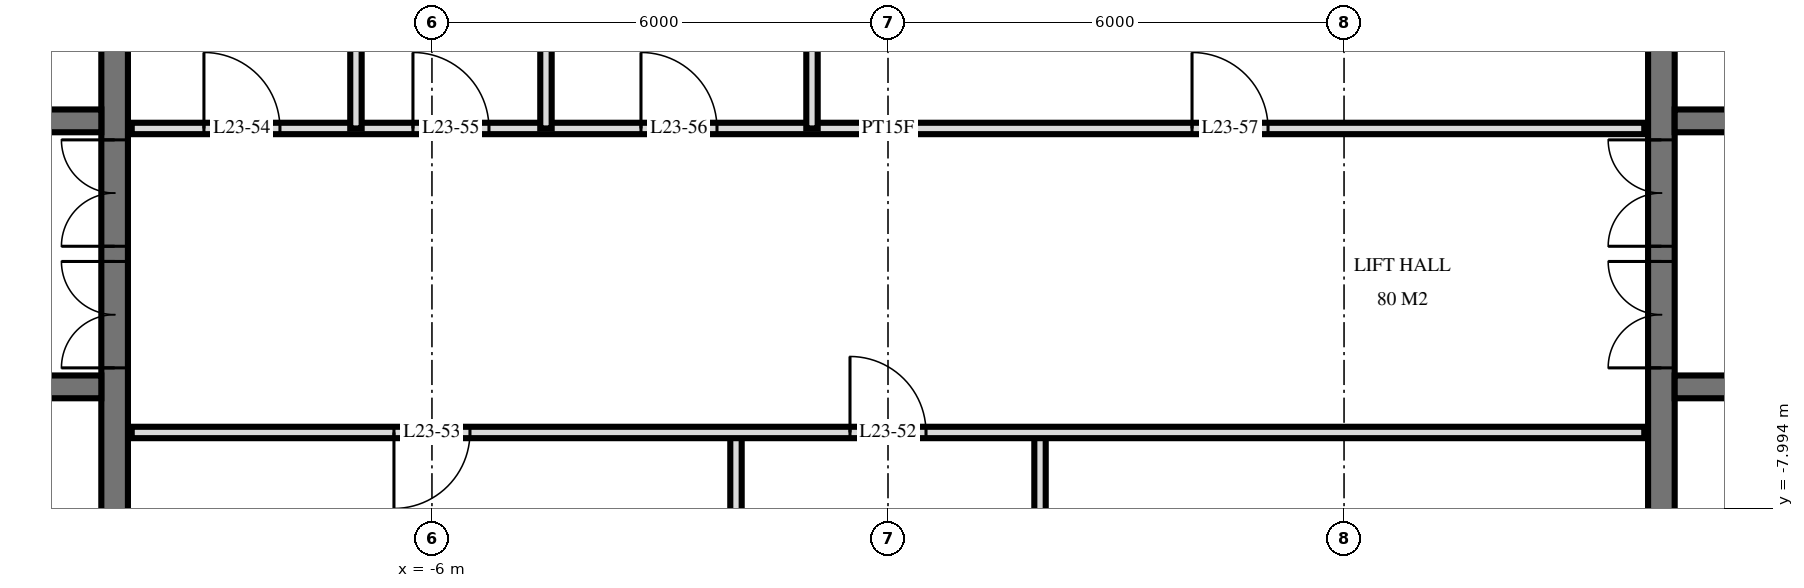
"""IFC4 building model, lengths in metres.
Left out: names, types, materials, properties, quantities, classifications, styles, units other than length and angle.
Written with IfcOpenShell. Run it as: python <this file> out.ifc"""

import sys

from ifc_helpers import new_model, si_unit, direction, frame, frame_2d, origin, place, context, subcontext, project, spatial, rectangle, extrude, element, fill, save


model = new_model("IFC4")
c1 = context("Model", 3, precision=1e-05, world=origin(), true_north=direction((0.0, 1.0)))
c2 = subcontext(c1, "Body", "Model", "MODEL_VIEW")
j1 = project(units=[si_unit("LENGTHUNIT", "METRE"), si_unit("PLANEANGLEUNIT", "RADIAN")], contexts=[c1])
p1 = place(None, origin())
s1 = spatial("IfcSite", under=j1, at=p1, CompositionType="ELEMENT")
p2 = place(p1, origin())
s2 = spatial("IfcBuilding", under=s1, at=p2, CompositionType="ELEMENT")
p3 = place(p2, frame((0.0, 0.0, 92.4)))
s3 = spatial("IfcBuildingStorey", under=s2, at=p3, CompositionType="ELEMENT", Elevation=92.4)
p4 = place(p3, frame((-10.175, -14.55, 0.0), z_axis=(0.0, 0.0, 1.0), x_axis=(0.0, 1.0, 0.0)))
e1 = element("IfcWall", 1, at=p4, inside=s3, PredefinedType="SHEAR", context=c2, shape_type="SweptSolid", body=[
    extrude(rectangle(XDim=14.1, YDim=0.35, at=frame_2d((7.05, 0.0))), origin(), (0.0, 0.0, 1.0), 3.6),
])
p5 = place(p4, frame((8.4, 0.0, 0.0)))
e2 = element("IfcOpeningElement", 2, at=p5, cuts=e1, PredefinedType="OPENING", context=c2, shape_type="SweptSolid", body=[
    extrude(rectangle(XDim=1.4, YDim=2.4, at=frame_2d((0.7, 1.2))), frame((0.0, 0.185, 0.0), z_axis=(0.0, -1.0, 0.0), x_axis=(1.0, 0.0, 0.0)), (0.0, 0.0, 1.0), 0.37),
])
p6 = place(p4, frame((10.0, 0.0, 0.0)))
e3 = element("IfcOpeningElement", 3, at=p6, cuts=e1, PredefinedType="OPENING", context=c2, shape_type="SweptSolid", body=[
    extrude(rectangle(XDim=1.4, YDim=2.4, at=frame_2d((0.7, 1.2))), frame((0.0, 0.185, 0.0), z_axis=(0.0, -1.0, 0.0), x_axis=(1.0, 0.0, 0.0)), (0.0, 0.0, 1.0), 0.37),
])
p7 = place(p4, frame((4.0, 0.0, 0.0)))
e4 = element("IfcOpeningElement", 4, at=p7, cuts=e1, PredefinedType="OPENING", context=c2, shape_type="SweptSolid", body=[
    extrude(rectangle(XDim=1.2, YDim=2.1, at=frame_2d((0.6, 1.05))), frame((0.0, 0.185, 0.0), z_axis=(0.0, -1.0, 0.0), x_axis=(1.0, 0.0, 0.0)), (0.0, 0.0, 1.0), 0.37),
])
p8 = place(p3, frame((-29.05, -2.9, 0.0), z_axis=(0.0, 0.0, 1.0), x_axis=(1.0, 0.0, 0.0)))
e5 = element("IfcWall", 5, at=p8, inside=s3, PredefinedType="SHEAR", context=c2, shape_type="SweptSolid", body=[
    extrude(rectangle(XDim=18.7, YDim=0.3, at=frame_2d((9.35, 0.0))), origin(), (0.0, 0.0, 1.0), 3.6),
])
p9 = place(p8, frame((2.95, 0.0, 0.0)))
e6 = element("IfcOpeningElement", 6, at=p9, cuts=e5, PredefinedType="OPENING", context=c2, shape_type="SweptSolid", body=[
    extrude(rectangle(XDim=1.1, YDim=2.1, at=frame_2d((0.55, 1.05))), frame((0.0, 0.16, 0.0), z_axis=(0.0, -1.0, 0.0), x_axis=(1.0, 0.0, 0.0)), (0.0, 0.0, 1.0), 0.32),
])
p10 = place(p8, frame((0.55, 0.0, 0.0)))
e7 = element("IfcOpeningElement", 7, at=p10, cuts=e5, PredefinedType="OPENING", context=c2, shape_type="SweptSolid", body=[
    extrude(rectangle(XDim=1.1, YDim=2.1, at=frame_2d((0.55, 1.05))), frame((0.0, 0.16, 0.0), z_axis=(0.0, -1.0, 0.0), x_axis=(1.0, 0.0, 0.0)), (0.0, 0.0, 1.0), 0.32),
])
p11 = place(p8, frame((10.9, 0.0, 0.0)))
e8 = element("IfcOpeningElement", 8, at=p11, cuts=e5, PredefinedType="OPENING", context=c2, shape_type="SweptSolid", body=[
    extrude(rectangle(XDim=0.9, YDim=2.1, at=frame_2d((0.45, 1.05))), frame((0.0, 0.16, 0.0), z_axis=(0.0, -1.0, 0.0), x_axis=(1.0, 0.0, 0.0)), (0.0, 0.0, 1.0), 0.32),
])
p12 = place(p8, frame((16.85, 0.0, 0.0)))
e9 = element("IfcOpeningElement", 9, at=p12, cuts=e5, PredefinedType="OPENING", context=c2, shape_type="SweptSolid", body=[
    extrude(rectangle(XDim=1.0, YDim=2.1, at=frame_2d((0.5, 1.05))), frame((0.0, 0.16, 0.0), z_axis=(0.0, -1.0, 0.0), x_axis=(1.0, 0.0, 0.0)), (0.0, 0.0, 1.0), 0.32),
])
p13 = place(p8, frame((14.312, 0.0, 0.0)))
e10 = element("IfcOpeningElement", 10, at=p13, cuts=e5, PredefinedType="OPENING", context=c2, shape_type="SweptSolid", body=[
    extrude(rectangle(XDim=1.0, YDim=2.1, at=frame_2d((0.5, 1.05))), frame((0.0, 0.16, 0.0), z_axis=(0.0, -1.0, 0.0), x_axis=(1.0, 0.0, 0.0)), (0.0, 0.0, 1.0), 0.32),
])
p14 = place(p8, frame((12.887, 0.0, 0.0)))
e11 = element("IfcOpeningElement", 11, at=p14, cuts=e5, PredefinedType="OPENING", context=c2, shape_type="SweptSolid", body=[
    extrude(rectangle(XDim=1.0, YDim=2.1, at=frame_2d((0.5, 1.05))), frame((0.0, 0.16, 0.0), z_axis=(0.0, -1.0, 0.0), x_axis=(1.0, 0.0, 0.0)), (0.0, 0.0, 1.0), 0.32),
])
p15 = place(p8, frame((5.6, 0.0, 0.0)))
e12 = element("IfcOpeningElement", 12, at=p15, cuts=e5, PredefinedType="OPENING", context=c2, shape_type="SweptSolid", body=[
    extrude(rectangle(XDim=1.0, YDim=2.1, at=frame_2d((0.5, 1.05))), frame((0.0, 0.16, 0.0), z_axis=(0.0, -1.0, 0.0), x_axis=(1.0, 0.0, 0.0)), (0.0, 0.0, 1.0), 0.32),
])
p16 = place(p3, frame((-29.05, -6.4, 0.0), z_axis=(0.0, 0.0, 1.0), x_axis=(1.0, 0.0, 0.0)))
e13 = element("IfcWall", 13, at=p16, inside=s3, PredefinedType="SHEAR", context=c2, shape_type="SweptSolid", body=[
    extrude(rectangle(XDim=18.7, YDim=0.3, at=frame_2d((9.35, 0.0))), origin(), (0.0, 0.0, 1.0), 3.6),
])
p17 = place(p16, frame((2.95, 0.0, 0.0)))
e14 = element("IfcOpeningElement", 14, at=p17, cuts=e13, PredefinedType="OPENING", context=c2, shape_type="SweptSolid", body=[
    extrude(rectangle(XDim=1.1, YDim=2.1, at=frame_2d((0.55, 1.05))), frame((0.0, 0.16, 0.0), z_axis=(0.0, -1.0, 0.0), x_axis=(1.0, 0.0, 0.0)), (0.0, 0.0, 1.0), 0.32),
])
p18 = place(p16, frame((0.55, 0.0, 0.0)))
e15 = element("IfcOpeningElement", 15, at=p18, cuts=e13, PredefinedType="OPENING", context=c2, shape_type="SweptSolid", body=[
    extrude(rectangle(XDim=1.1, YDim=2.1, at=frame_2d((0.55, 1.05))), frame((0.0, 0.16, 0.0), z_axis=(0.0, -1.0, 0.0), x_axis=(1.0, 0.0, 0.0)), (0.0, 0.0, 1.0), 0.32),
])
p19 = place(p16, frame((10.8, 0.0, 0.0)))
e16 = element("IfcOpeningElement", 16, at=p19, cuts=e13, PredefinedType="OPENING", context=c2, shape_type="SweptSolid", body=[
    extrude(rectangle(XDim=1.1, YDim=2.1, at=frame_2d((0.55, 1.05))), frame((0.0, 0.16, 0.0), z_axis=(0.0, -1.0, 0.0), x_axis=(1.0, 0.0, 0.0)), (0.0, 0.0, 1.0), 0.32),
])
p20 = place(p16, frame((5.6, 0.0, 0.0)))
e17 = element("IfcOpeningElement", 17, at=p20, cuts=e13, PredefinedType="OPENING", context=c2, shape_type="SweptSolid", body=[
    extrude(rectangle(XDim=1.0, YDim=2.1, at=frame_2d((0.5, 1.05))), frame((0.0, 0.16, 0.0), z_axis=(0.0, -1.0, 0.0), x_axis=(1.0, 0.0, 0.0)), (0.0, 0.0, 1.0), 0.32),
])
p21 = place(p3, frame((10.175, -14.55, 0.0), z_axis=(0.0, 0.0, 1.0), x_axis=(0.0, 1.0, 0.0)))
e18 = element("IfcWall", 18, at=p21, inside=s3, PredefinedType="SHEAR", context=c2, shape_type="SweptSolid", body=[
    extrude(rectangle(XDim=14.1, YDim=0.35, at=frame_2d((7.05, 0.0))), origin(), (0.0, 0.0, 1.0), 3.6),
])
p22 = place(p21, frame((8.4, 0.0, 0.0)))
e19 = element("IfcOpeningElement", 19, at=p22, cuts=e18, PredefinedType="OPENING", context=c2, shape_type="SweptSolid", body=[
    extrude(rectangle(XDim=1.4, YDim=2.4, at=frame_2d((0.7, 1.2))), frame((0.0, 0.185, 0.0), z_axis=(0.0, -1.0, 0.0), x_axis=(1.0, 0.0, 0.0)), (0.0, 0.0, 1.0), 0.37),
])
p23 = place(p21, frame((10.0, 0.0, 0.0)))
e20 = element("IfcOpeningElement", 20, at=p23, cuts=e18, PredefinedType="OPENING", context=c2, shape_type="SweptSolid", body=[
    extrude(rectangle(XDim=1.4, YDim=2.4, at=frame_2d((0.7, 1.2))), frame((0.0, 0.185, 0.0), z_axis=(0.0, -1.0, 0.0), x_axis=(1.0, 0.0, 0.0)), (0.0, 0.0, 1.0), 0.37),
])
p24 = place(p21, frame((4.0, 0.0, 0.0)))
e21 = element("IfcOpeningElement", 21, at=p24, cuts=e18, PredefinedType="OPENING", context=c2, shape_type="SweptSolid", body=[
    extrude(rectangle(XDim=1.2, YDim=2.1, at=frame_2d((0.6, 1.05))), frame((0.0, 0.185, 0.0), z_axis=(0.0, -1.0, 0.0), x_axis=(1.0, 0.0, 0.0)), (0.0, 0.0, 1.0), 0.37),
])
p25 = place(p3, frame((10.35, -2.9, 0.0), z_axis=(0.0, 0.0, 1.0), x_axis=(1.0, 0.0, 0.0)))
e22 = element("IfcWall", 22, at=p25, inside=s3, PredefinedType="SHEAR", context=c2, shape_type="SweptSolid", body=[
    extrude(rectangle(XDim=18.7, YDim=0.3, at=frame_2d((9.35, 0.0))), origin(), (0.0, 0.0, 1.0), 3.6),
])
p26 = place(p25, frame((14.65, 0.0, 0.0)))
e23 = element("IfcOpeningElement", 23, at=p26, cuts=e22, PredefinedType="OPENING", context=c2, shape_type="SweptSolid", body=[
    extrude(rectangle(XDim=1.1, YDim=2.1, at=frame_2d((0.55, 1.05))), frame((0.0, 0.16, 0.0), z_axis=(0.0, -1.0, 0.0), x_axis=(1.0, 0.0, 0.0)), (0.0, 0.0, 1.0), 0.32),
])
p27 = place(p25, frame((17.05, 0.0, 0.0)))
e24 = element("IfcOpeningElement", 24, at=p27, cuts=e22, PredefinedType="OPENING", context=c2, shape_type="SweptSolid", body=[
    extrude(rectangle(XDim=1.1, YDim=2.1, at=frame_2d((0.55, 1.05))), frame((0.0, 0.16, 0.0), z_axis=(0.0, -1.0, 0.0), x_axis=(1.0, 0.0, 0.0)), (0.0, 0.0, 1.0), 0.32),
])
p28 = place(p25, frame((6.9, 0.0, 0.0)))
e25 = element("IfcOpeningElement", 25, at=p28, cuts=e22, PredefinedType="OPENING", context=c2, shape_type="SweptSolid", body=[
    extrude(rectangle(XDim=0.9, YDim=2.1, at=frame_2d((0.45, 1.05))), frame((0.0, 0.16, 0.0), z_axis=(0.0, -1.0, 0.0), x_axis=(1.0, 0.0, 0.0)), (0.0, 0.0, 1.0), 0.32),
])
p29 = place(p25, frame((0.85, 0.0, 0.0)))
e26 = element("IfcOpeningElement", 26, at=p29, cuts=e22, PredefinedType="OPENING", context=c2, shape_type="SweptSolid", body=[
    extrude(rectangle(XDim=1.0, YDim=2.1, at=frame_2d((0.5, 1.05))), frame((0.0, 0.16, 0.0), z_axis=(0.0, -1.0, 0.0), x_axis=(1.0, 0.0, 0.0)), (0.0, 0.0, 1.0), 0.32),
])
p30 = place(p25, frame((3.387, 0.0, 0.0)))
e27 = element("IfcOpeningElement", 27, at=p30, cuts=e22, PredefinedType="OPENING", context=c2, shape_type="SweptSolid", body=[
    extrude(rectangle(XDim=1.0, YDim=2.1, at=frame_2d((0.5, 1.05))), frame((0.0, 0.16, 0.0), z_axis=(0.0, -1.0, 0.0), x_axis=(1.0, 0.0, 0.0)), (0.0, 0.0, 1.0), 0.32),
])
p31 = place(p25, frame((4.812, 0.0, 0.0)))
e28 = element("IfcOpeningElement", 28, at=p31, cuts=e22, PredefinedType="OPENING", context=c2, shape_type="SweptSolid", body=[
    extrude(rectangle(XDim=1.0, YDim=2.1, at=frame_2d((0.5, 1.05))), frame((0.0, 0.16, 0.0), z_axis=(0.0, -1.0, 0.0), x_axis=(1.0, 0.0, 0.0)), (0.0, 0.0, 1.0), 0.32),
])
p32 = place(p25, frame((12.1, 0.0, 0.0)))
e29 = element("IfcOpeningElement", 29, at=p32, cuts=e22, PredefinedType="OPENING", context=c2, shape_type="SweptSolid", body=[
    extrude(rectangle(XDim=1.0, YDim=2.1, at=frame_2d((0.5, 1.05))), frame((0.0, 0.16, 0.0), z_axis=(0.0, -1.0, 0.0), x_axis=(1.0, 0.0, 0.0)), (0.0, 0.0, 1.0), 0.32),
])
p33 = place(p3, frame((10.35, -6.4, 0.0), z_axis=(0.0, 0.0, 1.0), x_axis=(1.0, 0.0, 0.0)))
e30 = element("IfcWall", 30, at=p33, inside=s3, PredefinedType="SHEAR", context=c2, shape_type="SweptSolid", body=[
    extrude(rectangle(XDim=18.7, YDim=0.3, at=frame_2d((9.35, 0.0))), origin(), (0.0, 0.0, 1.0), 3.6),
])
p34 = place(p33, frame((14.65, 0.0, 0.0)))
e31 = element("IfcOpeningElement", 31, at=p34, cuts=e30, PredefinedType="OPENING", context=c2, shape_type="SweptSolid", body=[
    extrude(rectangle(XDim=1.1, YDim=2.1, at=frame_2d((0.55, 1.05))), frame((0.0, 0.16, 0.0), z_axis=(0.0, -1.0, 0.0), x_axis=(1.0, 0.0, 0.0)), (0.0, 0.0, 1.0), 0.32),
])
p35 = place(p33, frame((17.05, 0.0, 0.0)))
e32 = element("IfcOpeningElement", 32, at=p35, cuts=e30, PredefinedType="OPENING", context=c2, shape_type="SweptSolid", body=[
    extrude(rectangle(XDim=1.1, YDim=2.1, at=frame_2d((0.55, 1.05))), frame((0.0, 0.16, 0.0), z_axis=(0.0, -1.0, 0.0), x_axis=(1.0, 0.0, 0.0)), (0.0, 0.0, 1.0), 0.32),
])
p36 = place(p33, frame((6.8, 0.0, 0.0)))
e33 = element("IfcOpeningElement", 33, at=p36, cuts=e30, PredefinedType="OPENING", context=c2, shape_type="SweptSolid", body=[
    extrude(rectangle(XDim=1.1, YDim=2.1, at=frame_2d((0.55, 1.05))), frame((0.0, 0.16, 0.0), z_axis=(0.0, -1.0, 0.0), x_axis=(1.0, 0.0, 0.0)), (0.0, 0.0, 1.0), 0.32),
])
p37 = place(p33, frame((12.1, 0.0, 0.0)))
e34 = element("IfcOpeningElement", 34, at=p37, cuts=e30, PredefinedType="OPENING", context=c2, shape_type="SweptSolid", body=[
    extrude(rectangle(XDim=1.0, YDim=2.1, at=frame_2d((0.5, 1.05))), frame((0.0, 0.16, 0.0), z_axis=(0.0, -1.0, 0.0), x_axis=(1.0, 0.0, 0.0)), (0.0, 0.0, 1.0), 0.32),
])
p38 = place(p3, frame((2.0, -11.0, 0.0), z_axis=(0.0, 0.0, 1.0), x_axis=(0.0, 1.0, 0.0)))
e35 = element("IfcWall", 35, at=p38, inside=s3, PredefinedType="PARTITIONING", context=c2, shape_type="SweptSolid", body=[
    extrude(rectangle(XDim=4.0, YDim=0.15, at=frame_2d((2.0, 0.0))), origin(), (0.0, 0.0, 1.0), 3.32),
])
p39 = place(p3, frame((-1.0, -3.0, 0.0), z_axis=(0.0, 0.0, 1.0), x_axis=(0.0, 1.0, 0.0)))
e36 = element("IfcWall", 36, at=p39, inside=s3, PredefinedType="PARTITIONING", context=c2, shape_type="SweptSolid", body=[
    extrude(rectangle(XDim=4.02, YDim=0.15, at=frame_2d((2.01, 0.0))), origin(), (0.0, 0.0, 1.0), 3.32),
])
p40 = place(p3, frame((-2.0, -11.0, 0.0), z_axis=(0.0, 0.0, 1.0), x_axis=(0.0, 1.0, 0.0)))
e37 = element("IfcWall", 37, at=p40, inside=s3, PredefinedType="PARTITIONING", context=c2, shape_type="SweptSolid", body=[
    extrude(rectangle(XDim=4.0, YDim=0.15, at=frame_2d((2.0, 0.0))), origin(), (0.0, 0.0, 1.0), 3.32),
])
for number, where, z_axis, x_axis in (
    (38, (-4.5, -3.0, 0.0), (0.0, 0.0, 1.0), (0.0, 1.0, 0.0)),
    (39, (-7.0, -3.0, 0.0), (0.0, 0.0, 1.0), (0.0, 1.0, 0.0)),
):
    element("IfcWall", number, at=place(p3, frame(where, z_axis=z_axis, x_axis=x_axis)), inside=s3, PredefinedType="PLUMBINGWALL", context=c2, shape_type="SweptSolid", body=[
        extrude(rectangle(XDim=4.02, YDim=0.15, at=frame_2d((2.01, 0.0))), origin(), (0.0, 0.0, 1.0), 3.32),
    ])
p41 = place(p3, frame((-9.95, -7.0, 0.0), z_axis=(0.0, 0.0, 1.0), x_axis=(1.0, 0.0, 0.0)))
e40 = element("IfcWall", 40, at=p41, inside=s3, PredefinedType="PARTITIONING", context=c2, shape_type="SweptSolid", body=[
    extrude(rectangle(XDim=19.9, YDim=0.15, at=frame_2d((9.95, 0.0))), origin(), (0.0, 0.0, 1.0), 3.32),
])
p42 = place(p41, frame((9.45, 0.0, 0.0)))
e41 = element("IfcOpeningElement", 41, at=p42, cuts=e40, PredefinedType="OPENING", context=c2, shape_type="SweptSolid", body=[
    extrude(rectangle(XDim=1.0, YDim=2.1, at=frame_2d((0.5, 1.05))), frame((0.0, 0.085, 0.0), z_axis=(0.0, -1.0, 0.0), x_axis=(1.0, 0.0, 0.0)), (0.0, 0.0, 1.0), 0.17),
])
p43 = place(p41, frame((3.45, 0.0, 0.0)))
e42 = element("IfcOpeningElement", 42, at=p43, cuts=e40, PredefinedType="OPENING", context=c2, shape_type="SweptSolid", body=[
    extrude(rectangle(XDim=1.0, YDim=2.1, at=frame_2d((0.5, 1.05))), frame((0.0, 0.085, 0.0), z_axis=(0.0, -1.0, 0.0), x_axis=(1.0, 0.0, 0.0)), (0.0, 0.0, 1.0), 0.17),
])
p44 = place(p3, frame((-9.95, -3.0, 0.0), z_axis=(0.0, 0.0, 1.0), x_axis=(1.0, 0.0, 0.0)))
e43 = element("IfcWall", 43, at=p44, inside=s3, PredefinedType="PARTITIONING", context=c2, shape_type="SweptSolid", body=[
    extrude(rectangle(XDim=19.9, YDim=0.15, at=frame_2d((9.95, 0.0))), origin(), (0.0, 0.0, 1.0), 3.32),
])
p45 = place(p44, frame((0.95, 0.0, 0.0)))
e44 = element("IfcOpeningElement", 44, at=p45, cuts=e43, PredefinedType="OPENING", context=c2, shape_type="SweptSolid", body=[
    extrude(rectangle(XDim=1.0, YDim=2.1, at=frame_2d((0.5, 1.05))), frame((0.0, 0.085, 0.0), z_axis=(0.0, -1.0, 0.0), x_axis=(1.0, 0.0, 0.0)), (0.0, 0.0, 1.0), 0.17),
])
p46 = place(p44, frame((3.7, 0.0, 0.0)))
e45 = element("IfcOpeningElement", 45, at=p46, cuts=e43, PredefinedType="OPENING", context=c2, shape_type="SweptSolid", body=[
    extrude(rectangle(XDim=1.0, YDim=2.1, at=frame_2d((0.5, 1.05))), frame((0.0, 0.085, 0.0), z_axis=(0.0, -1.0, 0.0), x_axis=(1.0, 0.0, 0.0)), (0.0, 0.0, 1.0), 0.17),
])
p47 = place(p44, frame((6.7, 0.0, 0.0)))
e46 = element("IfcOpeningElement", 46, at=p47, cuts=e43, PredefinedType="OPENING", context=c2, shape_type="SweptSolid", body=[
    extrude(rectangle(XDim=1.0, YDim=2.1, at=frame_2d((0.5, 1.05))), frame((0.0, 0.085, 0.0), z_axis=(0.0, -1.0, 0.0), x_axis=(1.0, 0.0, 0.0)), (0.0, 0.0, 1.0), 0.17),
])
p48 = place(p44, frame((13.95, 0.0, 0.0)))
e47 = element("IfcOpeningElement", 47, at=p48, cuts=e43, PredefinedType="OPENING", context=c2, shape_type="SweptSolid", body=[
    extrude(rectangle(XDim=1.0, YDim=2.1, at=frame_2d((0.5, 1.05))), frame((0.0, 0.085, 0.0), z_axis=(0.0, -1.0, 0.0), x_axis=(1.0, 0.0, 0.0)), (0.0, 0.0, 1.0), 0.17),
])
p49 = place(p5, origin())
e48 = element("IfcDoor", 48, at=p49, inside=s3, OperationType="DOUBLE_DOOR_SINGLE_SWING", PredefinedType="DOOR", context=c2, shape_type="SweptSolid", body=[
    extrude(rectangle(XDim=1.4, YDim=2.4, at=frame_2d((0.7, 1.2))), frame((0.0, 0.025, 0.0), z_axis=(0.0, -1.0, 0.0), x_axis=(1.0, 0.0, 0.0)), (0.0, 0.0, 1.0), 0.05),
])
fill(e2, e48)
p50 = place(p6, origin())
e49 = element("IfcDoor", 49, at=p50, inside=s3, OperationType="DOUBLE_DOOR_SINGLE_SWING", PredefinedType="DOOR", context=c2, shape_type="SweptSolid", body=[
    extrude(rectangle(XDim=1.4, YDim=2.4, at=frame_2d((0.7, 1.2))), frame((0.0, 0.025, 0.0), z_axis=(0.0, -1.0, 0.0), x_axis=(1.0, 0.0, 0.0)), (0.0, 0.0, 1.0), 0.05),
])
fill(e3, e49)
p51 = place(p22, origin())
e50 = element("IfcDoor", 50, at=p51, inside=s3, OperationType="DOUBLE_DOOR_SINGLE_SWING", PredefinedType="DOOR", context=c2, shape_type="SweptSolid", body=[
    extrude(rectangle(XDim=1.4, YDim=2.4, at=frame_2d((0.7, 1.2))), frame((0.0, 0.025, 0.0), z_axis=(0.0, -1.0, 0.0), x_axis=(1.0, 0.0, 0.0)), (0.0, 0.0, 1.0), 0.05),
])
fill(e19, e50)
p52 = place(p23, origin())
e51 = element("IfcDoor", 51, at=p52, inside=s3, OperationType="DOUBLE_DOOR_SINGLE_SWING", PredefinedType="DOOR", context=c2, shape_type="SweptSolid", body=[
    extrude(rectangle(XDim=1.4, YDim=2.4, at=frame_2d((0.7, 1.2))), frame((0.0, 0.025, 0.0), z_axis=(0.0, -1.0, 0.0), x_axis=(1.0, 0.0, 0.0)), (0.0, 0.0, 1.0), 0.05),
])
fill(e20, e51)
p53 = place(p42, origin())
e52 = element("IfcDoor", 52, at=p53, inside=s3, OperationType="SINGLE_SWING_RIGHT", PredefinedType="DOOR", context=c2, shape_type="SweptSolid", body=[
    extrude(rectangle(XDim=1.0, YDim=2.1, at=frame_2d((0.5, 1.05))), frame((0.0, 0.025, 0.0), z_axis=(0.0, -1.0, 0.0), x_axis=(1.0, 0.0, 0.0)), (0.0, 0.0, 1.0), 0.05),
])
fill(e41, e52)
p54 = place(p43, frame((0.5, 0.0, 0.0), z_axis=(0.0, 0.0, 1.0), x_axis=(-1.0, 0.0, 0.0)))
e53 = element("IfcDoor", 53, at=p54, inside=s3, OperationType="SINGLE_SWING_LEFT", PredefinedType="DOOR", context=c2, shape_type="SweptSolid", body=[
    extrude(rectangle(XDim=1.0, YDim=2.1, at=frame_2d((0.0, 1.05))), frame((0.0, -0.025, 0.0), z_axis=(0.0, 1.0, 0.0), x_axis=(-1.0, 0.0, 0.0)), (0.0, 0.0, 1.0), 0.05),
])
fill(e42, e53)
p55 = place(p45, origin())
e54 = element("IfcDoor", 54, at=p55, inside=s3, OperationType="SINGLE_SWING_RIGHT", PredefinedType="DOOR", context=c2, shape_type="SweptSolid", body=[
    extrude(rectangle(XDim=1.0, YDim=2.1, at=frame_2d((0.5, 1.05))), frame((0.0, 0.025, 0.0), z_axis=(0.0, -1.0, 0.0), x_axis=(1.0, 0.0, 0.0)), (0.0, 0.0, 1.0), 0.05),
])
fill(e44, e54)
p56 = place(p46, origin())
e55 = element("IfcDoor", 55, at=p56, inside=s3, OperationType="SINGLE_SWING_RIGHT", PredefinedType="DOOR", context=c2, shape_type="SweptSolid", body=[
    extrude(rectangle(XDim=1.0, YDim=2.1, at=frame_2d((0.5, 1.05))), frame((0.0, 0.025, 0.0), z_axis=(0.0, -1.0, 0.0), x_axis=(1.0, 0.0, 0.0)), (0.0, 0.0, 1.0), 0.05),
])
fill(e45, e55)
p57 = place(p47, origin())
e56 = element("IfcDoor", 56, at=p57, inside=s3, OperationType="SINGLE_SWING_RIGHT", PredefinedType="DOOR", context=c2, shape_type="SweptSolid", body=[
    extrude(rectangle(XDim=1.0, YDim=2.1, at=frame_2d((0.5, 1.05))), frame((0.0, 0.025, 0.0), z_axis=(0.0, -1.0, 0.0), x_axis=(1.0, 0.0, 0.0)), (0.0, 0.0, 1.0), 0.05),
])
fill(e46, e56)
p58 = place(p48, origin())
e57 = element("IfcDoor", 57, at=p58, inside=s3, OperationType="SINGLE_SWING_RIGHT", PredefinedType="DOOR", context=c2, shape_type="SweptSolid", body=[
    extrude(rectangle(XDim=1.0, YDim=2.1, at=frame_2d((0.5, 1.05))), frame((0.0, 0.025, 0.0), z_axis=(0.0, -1.0, 0.0), x_axis=(1.0, 0.0, 0.0)), (0.0, 0.0, 1.0), 0.05),
])
fill(e47, e57)
save(model, sys.argv[1])
